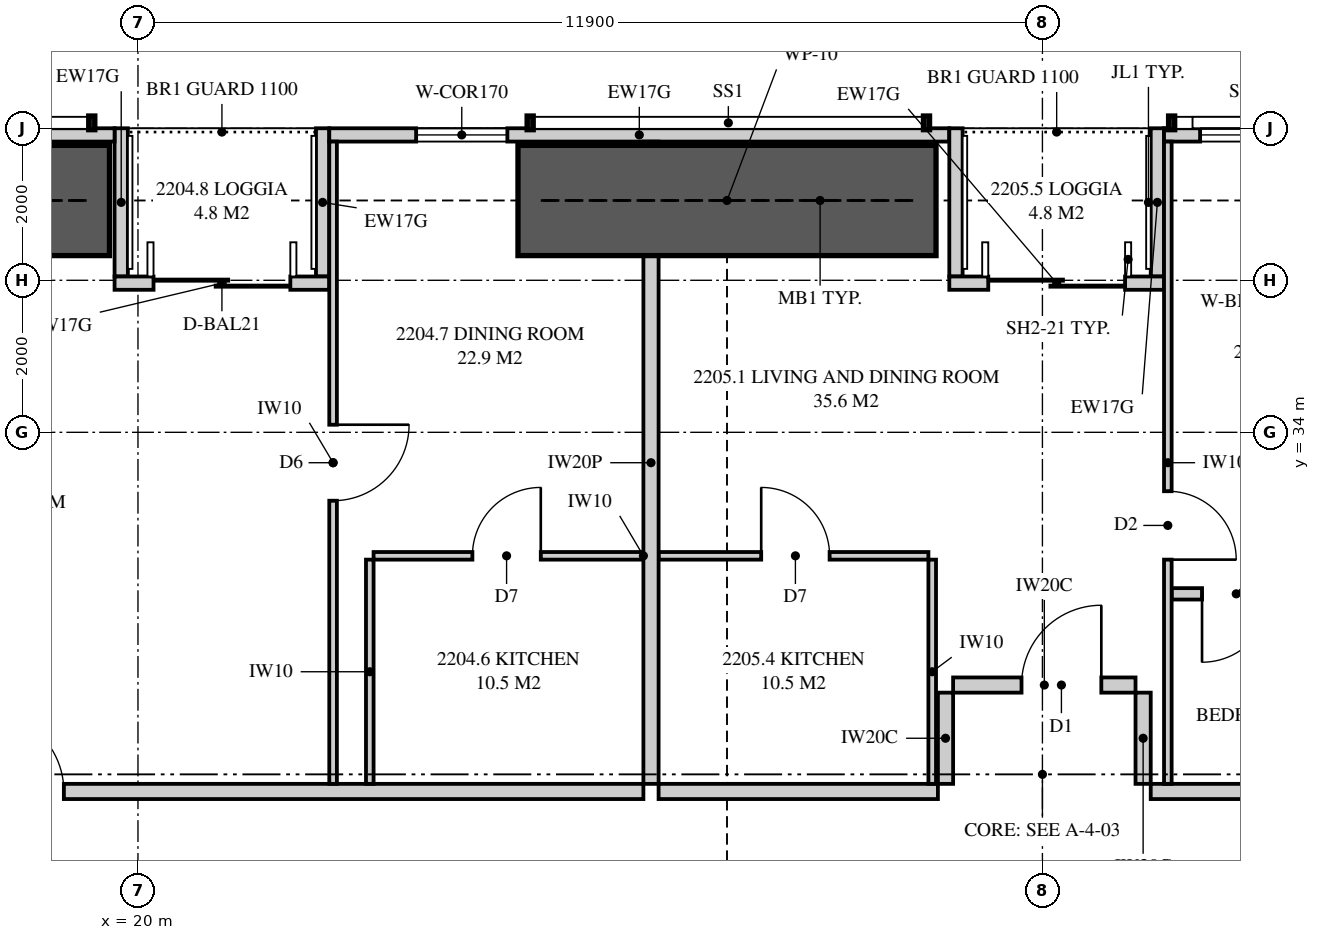
"""IFC4 building model, lengths in metres.
Left out: names, types, materials, properties, quantities, classifications, styles, units other than length and angle.
Written with IfcOpenShell. Run it as: python <this file> out.ifc"""

import sys

from ifc_helpers import new_model, si_unit, direction, frame, frame_2d, origin, place, context, subcontext, project, spatial, polyline, rectangle, outline, extrude, element, fill, save


model = new_model("IFC4")
c1 = context("Model", 3, precision=1e-05, world=origin(), true_north=direction((0.0, 1.0)))
c2 = subcontext(c1, "Body", "Model", "MODEL_VIEW")
j1 = project(units=[si_unit("LENGTHUNIT", "METRE"), si_unit("PLANEANGLEUNIT", "RADIAN")], contexts=[c1])
p1 = place(None, origin())
s1 = spatial("IfcSite", under=j1, at=p1, CompositionType="ELEMENT")
p2 = place(p1, origin())
s2 = spatial("IfcBuilding", under=s1, at=p2, CompositionType="ELEMENT")
p3 = place(p2, frame((0.0, 0.0, 84.75)))
s3 = spatial("IfcBuildingStorey", under=s2, at=p3, CompositionType="ELEMENT", Elevation=84.75)
p4 = place(p3, frame((39.829, 37.913, 0.0), z_axis=(0.0, 0.0, 1.0), x_axis=(-1.0, 0.0, 0.0)))
e1 = element("IfcWall", 1, at=p4, inside=s3, PredefinedType="SOLIDWALL", context=c2, shape_type="SweptSolid", body=[
    extrude(rectangle(XDim=6.329, YDim=0.175, at=frame_2d((3.165, 0.0))), origin(), (0.0, 0.0, 1.0), 2.15),
])
p5 = place(p4, frame((4.054, 0.0, 0.4)))
e2 = element("IfcOpeningElement", 2, at=p5, cuts=e1, PredefinedType="OPENING", context=c2, shape_type="SweptSolid", body=[
    extrude(rectangle(XDim=1.8, YDim=1.7, at=frame_2d((0.9, 0.85))), frame((0.0, 0.097, 0.0), z_axis=(0.0, -1.0, 0.0), x_axis=(1.0, 0.0, 0.0)), (0.0, 0.0, 1.0), 0.195),
])
p6 = place(p3, frame((30.675, 37.913, 0.0), z_axis=(0.0, 0.0, 1.0), x_axis=(-1.0, 0.0, 0.0)))
e3 = element("IfcWall", 3, at=p6, inside=s3, PredefinedType="SOLIDWALL", context=c2, shape_type="SweptSolid", body=[
    extrude(rectangle(XDim=8.158, YDim=0.175, at=frame_2d((4.079, 0.0))), origin(), (0.0, 0.0, 1.0), 2.15),
])
p7 = place(p6, frame((5.815, 0.0, 0.4)))
e4 = element("IfcOpeningElement", 4, at=p7, cuts=e3, PredefinedType="OPENING", context=c2, shape_type="SweptSolid", body=[
    extrude(rectangle(XDim=1.2, YDim=1.7, at=frame_2d((0.6, 0.85))), frame((0.0, 0.097, 0.0), z_axis=(0.0, -1.0, 0.0), x_axis=(1.0, 0.0, 0.0)), (0.0, 0.0, 1.0), 0.195),
])
p8 = place(p3, frame((19.692, 37.913, 0.0), z_axis=(0.0, 0.0, 1.0), x_axis=(-1.0, 0.0, 0.0)))
e5 = element("IfcWall", 5, at=p8, inside=s3, PredefinedType="SOLIDWALL", context=c2, shape_type="SweptSolid", body=[
    extrude(rectangle(XDim=4.021, YDim=0.175, at=frame_2d((2.011, 0.0))), origin(), (0.0, 0.0, 1.0), 2.15),
])
p9 = place(p3, frame((33.5, 35.962, 0.0), z_axis=(0.0, 0.0, 1.0), x_axis=(-1.0, 0.0, 0.0)))
e6 = element("IfcWall", 6, at=p9, inside=s3, PredefinedType="SOLIDWALL", context=c2, shape_type="SweptSolid", body=[
    extrude(rectangle(XDim=2.825, YDim=0.175, at=frame_2d((1.413, 0.0))), origin(), (0.0, 0.0, 1.0), 2.15),
])
p10 = place(p9, frame((0.512, 0.0, 0.0)))
e7 = element("IfcOpeningElement", 7, at=p10, cuts=e6, PredefinedType="OPENING", context=c2, shape_type="SweptSolid", body=[
    extrude(rectangle(XDim=1.8, YDim=2.1, at=frame_2d((0.9, 1.05))), frame((0.0, 0.097, 0.0), z_axis=(0.0, -1.0, 0.0), x_axis=(1.0, 0.0, 0.0)), (0.0, 0.0, 1.0), 0.195),
])
for number, where, z_axis, x_axis in (
    (8, (33.413, 38.0, 0.0), (0.0, 0.0, 1.0), (0.0, -1.0, 0.0)),
    (9, (30.762, 38.0, 0.0), (0.0, 0.0, 1.0), (0.0, -1.0, 0.0)),
):
    element("IfcWall", number, at=place(p3, frame(where, z_axis=z_axis, x_axis=x_axis)), inside=s3, PredefinedType="SOLIDWALL", context=c2, shape_type="SweptSolid", body=[
        extrude(rectangle(XDim=1.95, YDim=0.175, at=frame_2d((0.975, 0.0))), origin(), (0.0, 0.0, 1.0), 2.15),
    ])
p11 = place(p3, frame((22.517, 35.962, 0.0), z_axis=(0.0, 0.0, 1.0), x_axis=(-1.0, 0.0, 0.0)))
e10 = element("IfcWall", 10, at=p11, inside=s3, PredefinedType="SOLIDWALL", context=c2, shape_type="SweptSolid", body=[
    extrude(rectangle(XDim=2.825, YDim=0.175, at=frame_2d((1.413, 0.0))), origin(), (0.0, 0.0, 1.0), 2.15),
])
p12 = place(p11, frame((0.512, 0.0, 0.0)))
e11 = element("IfcOpeningElement", 11, at=p12, cuts=e10, PredefinedType="OPENING", context=c2, shape_type="SweptSolid", body=[
    extrude(rectangle(XDim=1.8, YDim=2.1, at=frame_2d((0.9, 1.05))), frame((0.0, 0.097, 0.0), z_axis=(0.0, -1.0, 0.0), x_axis=(1.0, 0.0, 0.0)), (0.0, 0.0, 1.0), 0.195),
])
for number, where, z_axis, x_axis in (
    (12, (22.43, 38.0, 0.0), (0.0, 0.0, 1.0), (0.0, -1.0, 0.0)),
    (13, (19.78, 38.0, 0.0), (0.0, 0.0, 1.0), (0.0, -1.0, 0.0)),
):
    element("IfcWall", number, at=place(p3, frame(where, z_axis=z_axis, x_axis=x_axis)), inside=s3, PredefinedType="SOLIDWALL", context=c2, shape_type="SweptSolid", body=[
        extrude(rectangle(XDim=1.95, YDim=0.175, at=frame_2d((0.975, 0.0))), origin(), (0.0, 0.0, 1.0), 2.15),
    ])
p13 = place(p3, frame((26.75, 37.825, 0.0), z_axis=(0.0, 0.0, 1.0), x_axis=(0.0, -1.0, 0.0)))
e14 = element("IfcWall", 14, at=p13, inside=s3, PredefinedType="PARTITIONING", context=c2, shape_type="SweptSolid", body=[
    extrude(outline(polyline([(0.529, 2.15), (0.0, 2.15), (0.0, 0.0), (0.529, 0.0), (0.529, 0.529), (1.021, 0.529), (1.021, 0.0), (8.45, 0.0), (8.45, 3.11), (1.885, 3.11), (1.885, 2.15), (1.021, 2.15), (1.021, 1.171), (0.529, 1.171), (0.529, 2.15)])), frame((0.0, 0.1, 0.0), z_axis=(0.0, -1.0, 0.0), x_axis=(1.0, 0.0, 0.0)), (0.0, 0.0, 1.0), 0.2),
])
p14 = place(p3, frame((17.775, 29.275, 0.0), z_axis=(0.0, 0.0, 1.0), x_axis=(1.0, 0.0, 0.0)))
e15 = element("IfcWall", 15, at=p14, inside=s3, PredefinedType="PARTITIONING", context=c2, shape_type="SweptSolid", body=[
    extrude(rectangle(XDim=8.875, YDim=0.2, at=frame_2d((4.438, 0.0))), origin(), (0.0, 0.0, 1.0), 3.11),
])
p15 = place(p14, frame((0.2, 0.0, 0.0)))
e16 = element("IfcOpeningElement", 16, at=p15, cuts=e15, PredefinedType="OPENING", context=c2, shape_type="SweptSolid", body=[
    extrude(rectangle(XDim=1.05, YDim=2.2, at=frame_2d((0.525, 1.1))), frame((0.0, 0.11, 0.0), z_axis=(0.0, -1.0, 0.0), x_axis=(1.0, 0.0, 0.0)), (0.0, 0.0, 1.0), 0.22),
])
p16 = place(p3, frame((23.1, 32.375, 0.0), z_axis=(0.0, 0.0, 1.0), x_axis=(1.0, 0.0, 0.0)))
e17 = element("IfcWall", 17, at=p16, inside=s3, PredefinedType="PARTITIONING", context=c2, shape_type="SweptSolid", body=[
    extrude(rectangle(XDim=3.55, YDim=0.1, at=frame_2d((1.775, 0.0))), origin(), (0.0, 0.0, 1.0), 3.11),
])
p17 = place(p16, frame((1.3, 0.0, 0.0)))
e18 = element("IfcOpeningElement", 18, at=p17, cuts=e17, PredefinedType="OPENING", context=c2, shape_type="SweptSolid", body=[
    extrude(rectangle(XDim=0.9, YDim=2.1, at=frame_2d((0.45, 1.05))), frame((0.0, 0.06, 0.0), z_axis=(0.0, -1.0, 0.0), x_axis=(1.0, 0.0, 0.0)), (0.0, 0.0, 1.0), 0.12),
])
p18 = place(p3, frame((23.05, 32.325, 0.0), z_axis=(0.0, 0.0, 1.0), x_axis=(0.0, -1.0, 0.0)))
e19 = element("IfcWall", 19, at=p18, inside=s3, PredefinedType="PARTITIONING", context=c2, shape_type="SweptSolid", body=[
    extrude(rectangle(XDim=2.95, YDim=0.1, at=frame_2d((1.475, 0.0))), origin(), (0.0, 0.0, 1.0), 3.11),
])
p19 = place(p3, frame((22.567, 37.825, 0.0), z_axis=(0.0, 0.0, 1.0), x_axis=(0.0, -1.0, 0.0)))
e20 = element("IfcWall", 20, at=p19, inside=s3, PredefinedType="PARTITIONING", context=c2, shape_type="SweptSolid", body=[
    extrude(outline(polyline([(0.0, 0.0), (8.45, 0.0), (8.45, 3.11), (1.835, 3.11), (1.835, 2.15), (0.0, 2.15), (0.0, 3.11), (0.0, 0.0)])), frame((0.0, 0.05, 0.0), z_axis=(0.0, -1.0, 0.0), x_axis=(1.0, 0.0, 0.0)), (0.0, 0.0, 1.0), 0.1),
])
p20 = place(p19, frame((3.725, 0.0, 0.0)))
e21 = element("IfcOpeningElement", 21, at=p20, cuts=e20, PredefinedType="OPENING", context=c2, shape_type="SweptSolid", body=[
    extrude(rectangle(XDim=1.0, YDim=2.1, at=frame_2d((0.5, 1.05))), frame((0.0, 0.06, 0.0), z_axis=(0.0, -1.0, 0.0), x_axis=(1.0, 0.0, 0.0)), (0.0, 0.0, 1.0), 0.12),
])
p21 = place(p3, frame((26.85, 29.275, 0.0), z_axis=(0.0, 0.0, 1.0), x_axis=(1.0, 0.0, 0.0)))
e22 = element("IfcWall", 22, at=p21, inside=s3, PredefinedType="PARTITIONING", context=c2, shape_type="SweptSolid", body=[
    extrude(outline(polyline([(0.0, 0.0), (3.675, 0.0), (3.675, 3.11), (1.246, 3.11), (1.246, 2.531), (0.554, 2.531), (0.554, 3.11), (0.0, 3.11), (0.0, 0.0)])), frame((0.0, 0.1, 0.0), z_axis=(0.0, -1.0, 0.0), x_axis=(1.0, 0.0, 0.0)), (0.0, 0.0, 1.0), 0.2),
])
p22 = place(p3, frame((33.55, 37.825, 0.0), z_axis=(0.0, 0.0, 1.0), x_axis=(0.0, -1.0, 0.0)))
e23 = element("IfcWall", 23, at=p22, inside=s3, PredefinedType="PARTITIONING", context=c2, shape_type="SweptSolid", body=[
    extrude(outline(polyline([(0.0, 0.0), (8.45, 0.0), (8.45, 3.11), (1.835, 3.11), (1.835, 2.15), (0.0, 2.15), (0.0, 3.11), (0.0, 0.0)])), frame((0.0, 0.05, 0.0), z_axis=(0.0, -1.0, 0.0), x_axis=(1.0, 0.0, 0.0)), (0.0, 0.0, 1.0), 0.1),
])
p23 = place(p22, frame((4.6, 0.0, 0.0)))
e24 = element("IfcOpeningElement", 24, at=p23, cuts=e23, PredefinedType="OPENING", context=c2, shape_type="SweptSolid", body=[
    extrude(rectangle(XDim=0.9, YDim=2.1, at=frame_2d((0.45, 1.05))), frame((0.0, 0.06, 0.0), z_axis=(0.0, -1.0, 0.0), x_axis=(1.0, 0.0, 0.0)), (0.0, 0.0, 1.0), 0.12),
])
p24 = place(p3, frame((33.6, 31.875, 0.0), z_axis=(0.0, 0.0, 1.0), x_axis=(1.0, 0.0, 0.0)))
e25 = element("IfcWall", 25, at=p24, inside=s3, PredefinedType="PLUMBINGWALL", context=c2, shape_type="SweptSolid", body=[
    extrude(rectangle(XDim=3.8, YDim=0.15, at=frame_2d((1.9, 0.0))), origin(), (0.0, 0.0, 1.0), 3.11),
])
p25 = place(p24, frame((0.4, 0.0, 0.0)))
e26 = element("IfcOpeningElement", 26, at=p25, cuts=e25, PredefinedType="OPENING", context=c2, shape_type="SweptSolid", body=[
    extrude(rectangle(XDim=0.9, YDim=2.1, at=frame_2d((0.45, 1.05))), frame((0.0, 0.085, 0.0), z_axis=(0.0, -1.0, 0.0), x_axis=(1.0, 0.0, 0.0)), (0.0, 0.0, 1.0), 0.17),
])
p26 = place(p3, frame((26.85, 32.375, 0.0), z_axis=(0.0, 0.0, 1.0), x_axis=(1.0, 0.0, 0.0)))
e27 = element("IfcWall", 27, at=p26, inside=s3, PredefinedType="PARTITIONING", context=c2, shape_type="SweptSolid", body=[
    extrude(outline(polyline([(0.0, 0.0), (3.55, 0.0), (3.55, 3.11), (1.196, 3.11), (1.196, 2.531), (0.604, 2.531), (0.604, 3.11), (0.0, 3.11), (0.0, 0.0)])), frame((0.0, 0.05, 0.0), z_axis=(0.0, -1.0, 0.0), x_axis=(1.0, 0.0, 0.0)), (0.0, 0.0, 1.0), 0.1),
])
p27 = place(p26, frame((1.35, 0.0, 0.0)))
e28 = element("IfcOpeningElement", 28, at=p27, cuts=e27, PredefinedType="OPENING", context=c2, shape_type="SweptSolid", body=[
    extrude(rectangle(XDim=0.9, YDim=2.1, at=frame_2d((0.45, 1.05))), frame((0.0, 0.06, 0.0), z_axis=(0.0, -1.0, 0.0), x_axis=(1.0, 0.0, 0.0)), (0.0, 0.0, 1.0), 0.12),
])
p28 = place(p3, frame((30.45, 32.325, 0.0), z_axis=(0.0, 0.0, 1.0), x_axis=(0.0, -1.0, 0.0)))
e29 = element("IfcWall", 29, at=p28, inside=s3, PredefinedType="PARTITIONING", context=c2, shape_type="SweptSolid", body=[
    extrude(rectangle(XDim=2.95, YDim=0.1, at=frame_2d((1.475, 0.0))), origin(), (0.0, 0.0, 1.0), 3.11),
])
p29 = place(p3, frame((33.325, 29.275, 0.0), z_axis=(0.0, 0.0, 1.0), x_axis=(1.0, 0.0, 0.0)))
e30 = element("IfcWall", 30, at=p29, inside=s3, PredefinedType="PARTITIONING", context=c2, shape_type="SweptSolid", body=[
    extrude(rectangle(XDim=4.075, YDim=0.2, at=frame_2d((2.038, 0.0))), origin(), (0.0, 0.0, 1.0), 3.11),
])
p30 = place(p3, frame((30.725, 30.675, 0.0), z_axis=(0.0, 0.0, 1.0), x_axis=(1.0, 0.0, 0.0)))
e31 = element("IfcWall", 31, at=p30, inside=s3, PredefinedType="PARTITIONING", context=c2, shape_type="SweptSolid", body=[
    extrude(rectangle(XDim=2.4, YDim=0.2, at=frame_2d((1.2, 0.0))), origin(), (0.0, 0.0, 1.0), 3.11),
])
p31 = place(p30, frame((0.9, 0.0, 0.0)))
e32 = element("IfcOpeningElement", 32, at=p31, cuts=e31, PredefinedType="OPENING", context=c2, shape_type="SweptSolid", body=[
    extrude(rectangle(XDim=1.05, YDim=2.2, at=frame_2d((0.525, 1.1))), frame((0.0, 0.11, 0.0), z_axis=(0.0, -1.0, 0.0), x_axis=(1.0, 0.0, 0.0)), (0.0, 0.0, 1.0), 0.22),
])
for number, where, z_axis, x_axis in (
    (33, (30.625, 29.375, 0.0), (0.0, 0.0, 1.0), (0.0, 1.0, 0.0)),
    (34, (33.225, 29.375, 0.0), (0.0, 0.0, 1.0), (0.0, 1.0, 0.0)),
):
    element("IfcWall", number, at=place(p3, frame(where, z_axis=z_axis, x_axis=x_axis)), inside=s3, PredefinedType="PARTITIONING", context=c2, shape_type="SweptSolid", body=[
        extrude(rectangle(XDim=1.2, YDim=0.2, at=frame_2d((0.6, 0.0))), origin(), (0.0, 0.0, 1.0), 3.11),
    ])
for number, where, z_axis, x_axis in (
    (35, (25.0, 37.05, 0.0), (0.0, 0.0, 1.0), (1.0, 0.0, 0.0)),
    (36, (14.125, 37.05, 0.0), (0.0, 0.0, 1.0), (1.0, 0.0, 0.0)),
):
    element("IfcWall", number, at=place(p3, frame(where, z_axis=z_axis, x_axis=x_axis)), inside=s3, PredefinedType="SHEAR", context=c2, shape_type="SweptSolid", body=[
        extrude(rectangle(XDim=5.5, YDim=1.45, at=frame_2d((2.75, 0.0))), origin(), (0.0, 0.0, 1.0), 3.35),
    ])
p32 = place(p5, origin())
e37 = element("IfcWindow", 37, at=p32, inside=s3, PartitioningType="SINGLE_PANEL", PredefinedType="WINDOW", context=c2, shape_type="SweptSolid", body=[
    extrude(rectangle(XDim=1.8, YDim=1.7, at=frame_2d((0.9, 0.85))), frame((0.0, 0.03, 0.0), z_axis=(0.0, -1.0, 0.0), x_axis=(1.0, 0.0, 0.0)), (0.0, 0.0, 1.0), 0.06),
])
fill(e2, e37)
p33 = place(p10, origin())
e38 = element("IfcDoor", 38, at=p33, inside=s3, OperationType="SLIDING_TO_LEFT", PredefinedType="DOOR", context=c2, shape_type="SweptSolid", body=[
    extrude(rectangle(XDim=1.8, YDim=2.1, at=frame_2d((0.9, 1.05))), frame((0.0, 0.025, 0.0), z_axis=(0.0, -1.0, 0.0), x_axis=(1.0, 0.0, 0.0)), (0.0, 0.0, 1.0), 0.05),
])
fill(e7, e38)
p34 = place(p7, origin())
e39 = element("IfcWindow", 39, at=p34, inside=s3, PartitioningType="SINGLE_PANEL", PredefinedType="WINDOW", context=c2, shape_type="SweptSolid", body=[
    extrude(rectangle(XDim=1.2, YDim=1.7, at=frame_2d((0.6, 0.85))), frame((0.0, 0.03, 0.0), z_axis=(0.0, -1.0, 0.0), x_axis=(1.0, 0.0, 0.0)), (0.0, 0.0, 1.0), 0.06),
])
fill(e4, e39)
p35 = place(p12, origin())
e40 = element("IfcDoor", 40, at=p35, inside=s3, OperationType="SLIDING_TO_LEFT", PredefinedType="DOOR", context=c2, shape_type="SweptSolid", body=[
    extrude(rectangle(XDim=1.8, YDim=2.1, at=frame_2d((0.9, 1.05))), frame((0.0, 0.025, 0.0), z_axis=(0.0, -1.0, 0.0), x_axis=(1.0, 0.0, 0.0)), (0.0, 0.0, 1.0), 0.05),
])
fill(e11, e40)
p36 = place(p15, origin())
e41 = element("IfcDoor", 41, at=p36, inside=s3, OperationType="SINGLE_SWING_LEFT", PredefinedType="DOOR", context=c2, shape_type="SweptSolid", body=[
    extrude(rectangle(XDim=1.05, YDim=2.2, at=frame_2d((0.525, 1.1))), frame((0.0, 0.025, 0.0), z_axis=(0.0, -1.0, 0.0), x_axis=(1.0, 0.0, 0.0)), (0.0, 0.0, 1.0), 0.05),
])
fill(e16, e41)
p37 = place(p17, origin())
e42 = element("IfcDoor", 42, at=p37, inside=s3, OperationType="SINGLE_SWING_RIGHT", PredefinedType="DOOR", context=c2, shape_type="SweptSolid", body=[
    extrude(rectangle(XDim=0.9, YDim=2.1, at=frame_2d((0.45, 1.05))), frame((0.0, 0.025, 0.0), z_axis=(0.0, -1.0, 0.0), x_axis=(1.0, 0.0, 0.0)), (0.0, 0.0, 1.0), 0.05),
])
fill(e18, e42)
p38 = place(p20, origin())
e43 = element("IfcDoor", 43, at=p38, inside=s3, OperationType="SINGLE_SWING_LEFT", PredefinedType="DOOR", context=c2, shape_type="SweptSolid", body=[
    extrude(rectangle(XDim=1.0, YDim=2.1, at=frame_2d((0.5, 1.05))), frame((0.0, 0.025, 0.0), z_axis=(0.0, -1.0, 0.0), x_axis=(1.0, 0.0, 0.0)), (0.0, 0.0, 1.0), 0.05),
])
fill(e21, e43)
p39 = place(p31, origin())
e44 = element("IfcDoor", 44, at=p39, inside=s3, OperationType="SINGLE_SWING_RIGHT", PredefinedType="DOOR", context=c2, shape_type="SweptSolid", body=[
    extrude(rectangle(XDim=1.05, YDim=2.2, at=frame_2d((0.525, 1.1))), frame((0.0, 0.025, 0.0), z_axis=(0.0, -1.0, 0.0), x_axis=(1.0, 0.0, 0.0)), (0.0, 0.0, 1.0), 0.05),
])
fill(e32, e44)
p40 = place(p23, origin())
e45 = element("IfcDoor", 45, at=p40, inside=s3, OperationType="SINGLE_SWING_RIGHT", PredefinedType="DOOR", context=c2, shape_type="SweptSolid", body=[
    extrude(rectangle(XDim=0.9, YDim=2.1, at=frame_2d((0.45, 1.05))), frame((0.0, 0.025, 0.0), z_axis=(0.0, -1.0, 0.0), x_axis=(1.0, 0.0, 0.0)), (0.0, 0.0, 1.0), 0.05),
])
fill(e24, e45)
p41 = place(p25, frame((0.9, 0.0, 0.0), z_axis=(0.0, 0.0, 1.0), x_axis=(-1.0, 0.0, 0.0)))
e46 = element("IfcDoor", 46, at=p41, inside=s3, OperationType="SINGLE_SWING_RIGHT", PredefinedType="DOOR", context=c2, shape_type="SweptSolid", body=[
    extrude(rectangle(XDim=0.9, YDim=2.1, at=frame_2d((0.45, 1.05))), frame((0.0, 0.025, 0.0), z_axis=(0.0, -1.0, 0.0), x_axis=(1.0, 0.0, 0.0)), (0.0, 0.0, 1.0), 0.05),
])
fill(e26, e46)
p42 = place(p27, origin())
e47 = element("IfcDoor", 47, at=p42, inside=s3, OperationType="SINGLE_SWING_LEFT", PredefinedType="DOOR", context=c2, shape_type="SweptSolid", body=[
    extrude(rectangle(XDim=0.9, YDim=2.1, at=frame_2d((0.45, 1.05))), frame((0.0, 0.025, 0.0), z_axis=(0.0, -1.0, 0.0), x_axis=(1.0, 0.0, 0.0)), (0.0, 0.0, 1.0), 0.05),
])
fill(e28, e47)
save(model, sys.argv[1])
